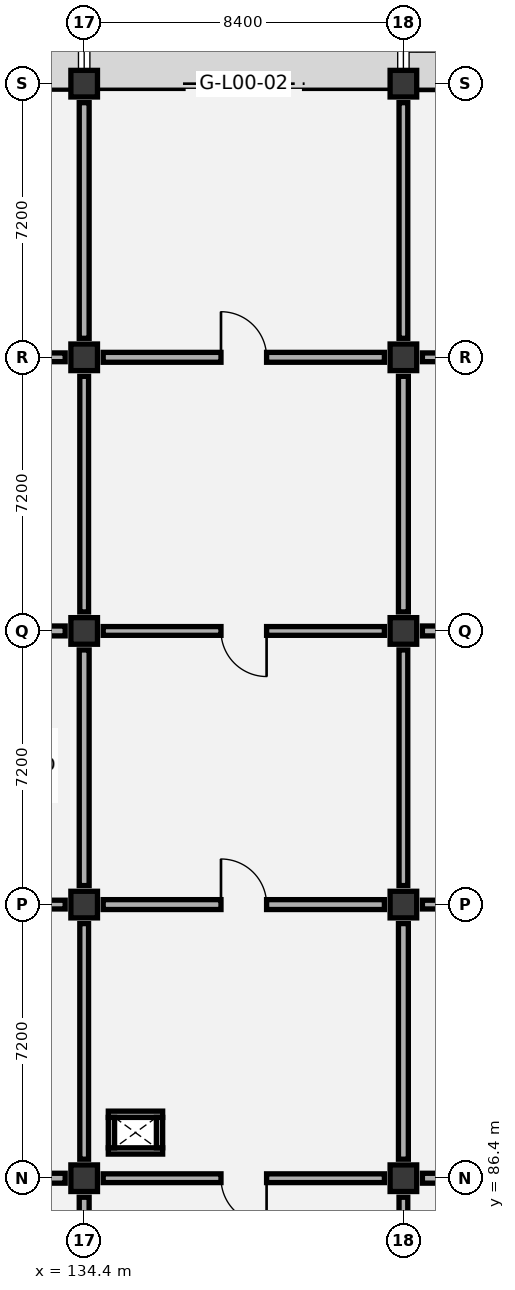
"""IFC4 building model, lengths in metres.
Left out: names, types, materials, properties, quantities, classifications, styles, units other than length and angle.
Written with IfcOpenShell. Run it as: python <this file> out.ifc"""

import sys

from ifc_helpers import new_model, si_unit, direction, frame, frame_2d, origin, origin_2d, place, context, subcontext, project, spatial, rectangle, extrude, element, fill, save


model = new_model("IFC4")
c1 = context("Model", 3, precision=1e-05, world=origin(), true_north=direction((0.0, 1.0)))
c2 = subcontext(c1, "Body", "Model", "MODEL_VIEW")
j1 = project(units=[si_unit("LENGTHUNIT", "METRE"), si_unit("PLANEANGLEUNIT", "RADIAN")], contexts=[c1])
p1 = place(None, origin())
s1 = spatial("IfcSite", under=j1, at=p1, CompositionType="ELEMENT")
p2 = place(p1, origin())
s2 = spatial("IfcBuilding", under=s1, at=p2, CompositionType="ELEMENT")
p3 = place(p2, origin())
s3 = spatial("IfcBuildingStorey", under=s2, at=p3, CompositionType="ELEMENT", Elevation=0.0)
for number, where, z_axis, x_axis in (
    (1, (134.4, 86.4, 0.0), (0.0, 0.0, 1.0), (1.0, 0.0, 0.0)),
    (2, (134.4, 93.6, 0.0), (0.0, 0.0, 1.0), (1.0, 0.0, 0.0)),
    (3, (134.4, 100.8, 0.0), (0.0, 0.0, 1.0), (1.0, 0.0, 0.0)),
    (4, (134.4, 108.0, 0.0), (0.0, 0.0, 1.0), (1.0, 0.0, 0.0)),
    (5, (134.4, 115.2, 0.0), (0.0, 0.0, 1.0), (1.0, 0.0, 0.0)),
    (6, (142.8, 86.4, 0.0), (0.0, 0.0, 1.0), (1.0, 0.0, 0.0)),
    (7, (142.8, 93.6, 0.0), (0.0, 0.0, 1.0), (1.0, 0.0, 0.0)),
    (8, (142.8, 100.8, 0.0), (0.0, 0.0, 1.0), (1.0, 0.0, 0.0)),
    (9, (142.8, 108.0, 0.0), (0.0, 0.0, 1.0), (1.0, 0.0, 0.0)),
    (10, (142.8, 115.2, 0.0), (0.0, 0.0, 1.0), (1.0, 0.0, 0.0)),
):
    element("IfcColumn", number, at=place(p3, frame(where, z_axis=z_axis, x_axis=x_axis)), inside=s3, PredefinedType="COLUMN", context=c2, shape_type="SweptSolid", body=[
        extrude(rectangle(XDim=0.7, YDim=0.7, at=origin_2d()), origin(), (0.0, 0.0, 1.0), 6.0),
    ])
p4 = place(p3, frame((126.35, 115.2, 0.0), z_axis=(0.0, 0.0, 1.0), x_axis=(1.0, 0.0, 0.0)))
e11 = element("IfcWall", 11, at=p4, inside=s3, PredefinedType="SOLIDWALL", context=c2, shape_type="SweptSolid", body=[
    extrude(rectangle(XDim=7.7, YDim=0.29, at=frame_2d((3.85, 0.0))), origin(), (0.0, 0.0, 1.0), 5.12),
])
p5 = place(p4, frame((2.05, 0.0, 0.0)))
e12 = element("IfcOpeningElement", 12, at=p5, cuts=e11, PredefinedType="OPENING", context=c2, shape_type="SweptSolid", body=[
    extrude(rectangle(XDim=3.6, YDim=3.6, at=frame_2d((1.8, 1.8))), frame((0.0, 0.155, 0.0), z_axis=(0.0, -1.0, 0.0), x_axis=(1.0, 0.0, 0.0)), (0.0, 0.0, 1.0), 0.31),
])
p6 = place(p3, frame((134.75, 115.2, 0.0), z_axis=(0.0, 0.0, 1.0), x_axis=(1.0, 0.0, 0.0)))
e13 = element("IfcWall", 13, at=p6, inside=s3, PredefinedType="SOLIDWALL", context=c2, shape_type="SweptSolid", body=[
    extrude(rectangle(XDim=7.7, YDim=0.25, at=frame_2d((3.85, 0.0))), origin(), (0.0, 0.0, 1.0), 5.12),
])
p7 = place(p6, frame((2.25, 0.0, 0.0)))
e14 = element("IfcOpeningElement", 14, at=p7, cuts=e13, PredefinedType="OPENING", context=c2, shape_type="SweptSolid", body=[
    extrude(rectangle(XDim=3.2, YDim=3.2, at=frame_2d((1.6, 1.6))), frame((0.0, 0.135, 0.0), z_axis=(0.0, -1.0, 0.0), x_axis=(1.0, 0.0, 0.0)), (0.0, 0.0, 1.0), 0.27),
])
p8 = place(p3, frame((143.15, 115.2, 0.0), z_axis=(0.0, 0.0, 1.0), x_axis=(1.0, 0.0, 0.0)))
e15 = element("IfcWall", 15, at=p8, inside=s3, PredefinedType="SOLIDWALL", context=c2, shape_type="SweptSolid", body=[
    extrude(rectangle(XDim=7.7, YDim=0.31, at=frame_2d((3.85, 0.0))), origin(), (0.0, 0.0, 1.0), 5.12),
])
p9 = place(p8, frame((2.45, 0.0, 0.0)))
e16 = element("IfcOpeningElement", 16, at=p9, cuts=e15, PredefinedType="OPENING", context=c2, shape_type="SweptSolid", body=[
    extrude(rectangle(XDim=2.8, YDim=3.0, at=frame_2d((1.4, 1.5))), frame((0.0, 0.165, 0.0), z_axis=(0.0, -1.0, 0.0), x_axis=(1.0, 0.0, 0.0)), (0.0, 0.0, 1.0), 0.33),
])
for number, where, z_axis, x_axis in (
    (17, (135.035, 87.117, 0.0), (0.0, 0.0, 1.0), (1.0, 0.0, 0.0)),
    (18, (135.035, 88.083, 0.0), (0.0, 0.0, 1.0), (1.0, 0.0, 0.0)),
):
    element("IfcWall", number, at=place(p3, frame(where, z_axis=z_axis, x_axis=x_axis)), inside=s3, PredefinedType="PARTITIONING", context=c2, shape_type="SweptSolid", body=[
        extrude(rectangle(XDim=1.43, YDim=0.165, at=frame_2d((0.715, 0.0))), origin(), (0.0, 0.0, 1.0), 5.675),
    ])
for number, where, z_axis, x_axis in (
    (19, (135.117, 87.2, 0.0), (0.0, 0.0, 1.0), (0.0, 1.0, 0.0)),
    (20, (136.383, 87.2, 0.0), (0.0, 0.0, 1.0), (0.0, 1.0, 0.0)),
):
    element("IfcWall", number, at=place(p3, frame(where, z_axis=z_axis, x_axis=x_axis)), inside=s3, PredefinedType="PARTITIONING", context=c2, shape_type="SweptSolid", body=[
        extrude(rectangle(XDim=0.8, YDim=0.165, at=frame_2d((0.4, 0.0))), origin(), (0.0, 0.0, 1.0), 5.675),
    ])
p10 = place(p3, frame((134.4, 79.7, 0.0), z_axis=(0.0, 0.0, 1.0), x_axis=(0.0, 1.0, 0.0)))
e21 = element("IfcWall", 21, at=p10, inside=s3, PredefinedType="PARTITIONING", context=c2, shape_type="SweptSolid", body=[
    extrude(rectangle(XDim=6.2, YDim=0.26, at=frame_2d((3.1, 0.0))), origin(), (0.0, 0.0, 1.0), 4.92),
])
p11 = place(p10, frame((2.5, 0.0, 0.0)))
e22 = element("IfcOpeningElement", 22, at=p11, cuts=e21, PredefinedType="OPENING", context=c2, shape_type="SweptSolid", body=[
    extrude(rectangle(XDim=1.2, YDim=2.1, at=frame_2d((0.6, 1.05))), frame((0.0, 0.14, 0.0), z_axis=(0.0, -1.0, 0.0), x_axis=(1.0, 0.0, 0.0)), (0.0, 0.0, 1.0), 0.28),
])
p12 = place(p3, frame((126.5, 86.4, 0.0), z_axis=(0.0, 0.0, 1.0), x_axis=(1.0, 0.0, 0.0)))
e23 = element("IfcWall", 23, at=p12, inside=s3, PredefinedType="PARTITIONING", context=c2, shape_type="SweptSolid", body=[
    extrude(rectangle(XDim=7.4, YDim=0.26, at=frame_2d((3.7, 0.0))), origin(), (0.0, 0.0, 1.0), 4.87),
])
p13 = place(p12, frame((3.1, 0.0, 0.0)))
e24 = element("IfcOpeningElement", 24, at=p13, cuts=e23, PredefinedType="OPENING", context=c2, shape_type="SweptSolid", body=[
    extrude(rectangle(XDim=1.2, YDim=2.1, at=frame_2d((0.6, 1.05))), frame((0.0, 0.14, 0.0), z_axis=(0.0, -1.0, 0.0), x_axis=(1.0, 0.0, 0.0)), (0.0, 0.0, 1.0), 0.28),
])
p14 = place(p3, frame((134.4, 86.9, 0.0), z_axis=(0.0, 0.0, 1.0), x_axis=(0.0, 1.0, 0.0)))
e25 = element("IfcWall", 25, at=p14, inside=s3, PredefinedType="PARTITIONING", context=c2, shape_type="SweptSolid", body=[
    extrude(rectangle(XDim=6.2, YDim=0.23, at=frame_2d((3.1, 0.0))), origin(), (0.0, 0.0, 1.0), 5.17),
])
p15 = place(p3, frame((126.5, 93.6, 0.0), z_axis=(0.0, 0.0, 1.0), x_axis=(1.0, 0.0, 0.0)))
e26 = element("IfcWall", 26, at=p15, inside=s3, PredefinedType="PARTITIONING", context=c2, shape_type="SweptSolid", body=[
    extrude(rectangle(XDim=7.4, YDim=0.23, at=frame_2d((3.7, 0.0))), origin(), (0.0, 0.0, 1.0), 4.87),
])
p16 = place(p15, frame((3.1, 0.0, 0.0)))
e27 = element("IfcOpeningElement", 27, at=p16, cuts=e26, PredefinedType="OPENING", context=c2, shape_type="SweptSolid", body=[
    extrude(rectangle(XDim=1.2, YDim=2.1, at=frame_2d((0.6, 1.05))), frame((0.0, 0.125, 0.0), z_axis=(0.0, -1.0, 0.0), x_axis=(1.0, 0.0, 0.0)), (0.0, 0.0, 1.0), 0.25),
])
p17 = place(p3, frame((134.4, 94.1, 0.0), z_axis=(0.0, 0.0, 1.0), x_axis=(0.0, 1.0, 0.0)))
e28 = element("IfcWall", 28, at=p17, inside=s3, PredefinedType="PARTITIONING", context=c2, shape_type="SweptSolid", body=[
    extrude(rectangle(XDim=6.2, YDim=0.26, at=frame_2d((3.1, 0.0))), origin(), (0.0, 0.0, 1.0), 5.02),
])
p18 = place(p3, frame((126.5, 100.8, 0.0), z_axis=(0.0, 0.0, 1.0), x_axis=(1.0, 0.0, 0.0)))
e29 = element("IfcWall", 29, at=p18, inside=s3, PredefinedType="PARTITIONING", context=c2, shape_type="SweptSolid", body=[
    extrude(rectangle(XDim=7.4, YDim=0.26, at=frame_2d((3.7, 0.0))), origin(), (0.0, 0.0, 1.0), 4.97),
])
p19 = place(p18, frame((3.1, 0.0, 0.0)))
e30 = element("IfcOpeningElement", 30, at=p19, cuts=e29, PredefinedType="OPENING", context=c2, shape_type="SweptSolid", body=[
    extrude(rectangle(XDim=1.2, YDim=2.1, at=frame_2d((0.6, 1.05))), frame((0.0, 0.14, 0.0), z_axis=(0.0, -1.0, 0.0), x_axis=(1.0, 0.0, 0.0)), (0.0, 0.0, 1.0), 0.28),
])
p20 = place(p3, frame((134.4, 101.3, 0.0), z_axis=(0.0, 0.0, 1.0), x_axis=(0.0, 1.0, 0.0)))
e31 = element("IfcWall", 31, at=p20, inside=s3, PredefinedType="PARTITIONING", context=c2, shape_type="SweptSolid", body=[
    extrude(rectangle(XDim=6.2, YDim=0.23, at=frame_2d((3.1, 0.0))), origin(), (0.0, 0.0, 1.0), 5.37),
])
p21 = place(p3, frame((126.5, 108.0, 0.0), z_axis=(0.0, 0.0, 1.0), x_axis=(1.0, 0.0, 0.0)))
e32 = element("IfcWall", 32, at=p21, inside=s3, PredefinedType="PARTITIONING", context=c2, shape_type="SweptSolid", body=[
    extrude(rectangle(XDim=7.4, YDim=0.23, at=frame_2d((3.7, 0.0))), origin(), (0.0, 0.0, 1.0), 4.97),
])
p22 = place(p21, frame((3.1, 0.0, 0.0)))
e33 = element("IfcOpeningElement", 33, at=p22, cuts=e32, PredefinedType="OPENING", context=c2, shape_type="SweptSolid", body=[
    extrude(rectangle(XDim=1.2, YDim=2.1, at=frame_2d((0.6, 1.05))), frame((0.0, 0.125, 0.0), z_axis=(0.0, -1.0, 0.0), x_axis=(1.0, 0.0, 0.0)), (0.0, 0.0, 1.0), 0.25),
])
p23 = place(p3, frame((134.4, 108.5, 0.0), z_axis=(0.0, 0.0, 1.0), x_axis=(0.0, 1.0, 0.0)))
e34 = element("IfcWall", 34, at=p23, inside=s3, PredefinedType="PARTITIONING", context=c2, shape_type="SweptSolid", body=[
    extrude(rectangle(XDim=6.2, YDim=0.26, at=frame_2d((3.1, 0.0))), origin(), (0.0, 0.0, 1.0), 5.02),
])
p24 = place(p3, frame((142.8, 79.7, 0.0), z_axis=(0.0, 0.0, 1.0), x_axis=(0.0, 1.0, 0.0)))
e35 = element("IfcWall", 35, at=p24, inside=s3, PredefinedType="PARTITIONING", context=c2, shape_type="SweptSolid", body=[
    extrude(rectangle(XDim=6.2, YDim=0.23, at=frame_2d((3.1, 0.0))), origin(), (0.0, 0.0, 1.0), 5.17),
])
p25 = place(p24, frame((2.5, 0.0, 0.0)))
e36 = element("IfcOpeningElement", 36, at=p25, cuts=e35, PredefinedType="OPENING", context=c2, shape_type="SweptSolid", body=[
    extrude(rectangle(XDim=1.2, YDim=2.1, at=frame_2d((0.6, 1.05))), frame((0.0, 0.125, 0.0), z_axis=(0.0, -1.0, 0.0), x_axis=(1.0, 0.0, 0.0)), (0.0, 0.0, 1.0), 0.25),
])
p26 = place(p3, frame((134.9, 86.4, 0.0), z_axis=(0.0, 0.0, 1.0), x_axis=(1.0, 0.0, 0.0)))
e37 = element("IfcWall", 37, at=p26, inside=s3, PredefinedType="PARTITIONING", context=c2, shape_type="SweptSolid", body=[
    extrude(rectangle(XDim=7.4, YDim=0.23, at=frame_2d((3.7, 0.0))), origin(), (0.0, 0.0, 1.0), 4.87),
])
p27 = place(p26, frame((3.1, 0.0, 0.0)))
e38 = element("IfcOpeningElement", 38, at=p27, cuts=e37, PredefinedType="OPENING", context=c2, shape_type="SweptSolid", body=[
    extrude(rectangle(XDim=1.2, YDim=2.1, at=frame_2d((0.6, 1.05))), frame((0.0, 0.125, 0.0), z_axis=(0.0, -1.0, 0.0), x_axis=(1.0, 0.0, 0.0)), (0.0, 0.0, 1.0), 0.25),
])
p28 = place(p3, frame((142.8, 86.9, 0.0), z_axis=(0.0, 0.0, 1.0), x_axis=(0.0, 1.0, 0.0)))
e39 = element("IfcWall", 39, at=p28, inside=s3, PredefinedType="PARTITIONING", context=c2, shape_type="SweptSolid", body=[
    extrude(rectangle(XDim=6.2, YDim=0.26, at=frame_2d((3.1, 0.0))), origin(), (0.0, 0.0, 1.0), 4.92),
])
p29 = place(p3, frame((134.9, 93.6, 0.0), z_axis=(0.0, 0.0, 1.0), x_axis=(1.0, 0.0, 0.0)))
e40 = element("IfcWall", 40, at=p29, inside=s3, PredefinedType="PARTITIONING", context=c2, shape_type="SweptSolid", body=[
    extrude(rectangle(XDim=7.4, YDim=0.26, at=frame_2d((3.7, 0.0))), origin(), (0.0, 0.0, 1.0), 4.87),
])
p30 = place(p29, frame((3.1, 0.0, 0.0)))
e41 = element("IfcOpeningElement", 41, at=p30, cuts=e40, PredefinedType="OPENING", context=c2, shape_type="SweptSolid", body=[
    extrude(rectangle(XDim=1.2, YDim=2.1, at=frame_2d((0.6, 1.05))), frame((0.0, 0.14, 0.0), z_axis=(0.0, -1.0, 0.0), x_axis=(1.0, 0.0, 0.0)), (0.0, 0.0, 1.0), 0.28),
])
p31 = place(p3, frame((142.8, 94.1, 0.0), z_axis=(0.0, 0.0, 1.0), x_axis=(0.0, 1.0, 0.0)))
e42 = element("IfcWall", 42, at=p31, inside=s3, PredefinedType="PARTITIONING", context=c2, shape_type="SweptSolid", body=[
    extrude(rectangle(XDim=6.2, YDim=0.23, at=frame_2d((3.1, 0.0))), origin(), (0.0, 0.0, 1.0), 5.37),
])
p32 = place(p3, frame((134.9, 100.8, 0.0), z_axis=(0.0, 0.0, 1.0), x_axis=(1.0, 0.0, 0.0)))
e43 = element("IfcWall", 43, at=p32, inside=s3, PredefinedType="PARTITIONING", context=c2, shape_type="SweptSolid", body=[
    extrude(rectangle(XDim=7.4, YDim=0.23, at=frame_2d((3.7, 0.0))), origin(), (0.0, 0.0, 1.0), 4.97),
])
p33 = place(p32, frame((3.1, 0.0, 0.0)))
e44 = element("IfcOpeningElement", 44, at=p33, cuts=e43, PredefinedType="OPENING", context=c2, shape_type="SweptSolid", body=[
    extrude(rectangle(XDim=1.2, YDim=2.1, at=frame_2d((0.6, 1.05))), frame((0.0, 0.125, 0.0), z_axis=(0.0, -1.0, 0.0), x_axis=(1.0, 0.0, 0.0)), (0.0, 0.0, 1.0), 0.25),
])
p34 = place(p3, frame((142.8, 101.3, 0.0), z_axis=(0.0, 0.0, 1.0), x_axis=(0.0, 1.0, 0.0)))
e45 = element("IfcWall", 45, at=p34, inside=s3, PredefinedType="PARTITIONING", context=c2, shape_type="SweptSolid", body=[
    extrude(rectangle(XDim=6.2, YDim=0.26, at=frame_2d((3.1, 0.0))), origin(), (0.0, 0.0, 1.0), 5.02),
])
p35 = place(p3, frame((134.9, 108.0, 0.0), z_axis=(0.0, 0.0, 1.0), x_axis=(1.0, 0.0, 0.0)))
e46 = element("IfcWall", 46, at=p35, inside=s3, PredefinedType="PARTITIONING", context=c2, shape_type="SweptSolid", body=[
    extrude(rectangle(XDim=7.4, YDim=0.26, at=frame_2d((3.7, 0.0))), origin(), (0.0, 0.0, 1.0), 4.97),
])
p36 = place(p35, frame((3.1, 0.0, 0.0)))
e47 = element("IfcOpeningElement", 47, at=p36, cuts=e46, PredefinedType="OPENING", context=c2, shape_type="SweptSolid", body=[
    extrude(rectangle(XDim=1.2, YDim=2.1, at=frame_2d((0.6, 1.05))), frame((0.0, 0.14, 0.0), z_axis=(0.0, -1.0, 0.0), x_axis=(1.0, 0.0, 0.0)), (0.0, 0.0, 1.0), 0.28),
])
p37 = place(p3, frame((142.8, 108.5, 0.0), z_axis=(0.0, 0.0, 1.0), x_axis=(0.0, 1.0, 0.0)))
e48 = element("IfcWall", 48, at=p37, inside=s3, PredefinedType="PARTITIONING", context=c2, shape_type="SweptSolid", body=[
    extrude(rectangle(XDim=6.2, YDim=0.23, at=frame_2d((3.1, 0.0))), origin(), (0.0, 0.0, 1.0), 5.48),
])
p38 = place(p3, frame((143.3, 86.4, 0.0), z_axis=(0.0, 0.0, 1.0), x_axis=(1.0, 0.0, 0.0)))
e49 = element("IfcWall", 49, at=p38, inside=s3, PredefinedType="PARTITIONING", context=c2, shape_type="SweptSolid", body=[
    extrude(rectangle(XDim=7.4, YDim=0.26, at=frame_2d((3.7, 0.0))), origin(), (0.0, 0.0, 1.0), 4.87),
])
p39 = place(p38, frame((3.1, 0.0, 0.0)))
e50 = element("IfcOpeningElement", 50, at=p39, cuts=e49, PredefinedType="OPENING", context=c2, shape_type="SweptSolid", body=[
    extrude(rectangle(XDim=1.2, YDim=2.1, at=frame_2d((0.6, 1.05))), frame((0.0, 0.14, 0.0), z_axis=(0.0, -1.0, 0.0), x_axis=(1.0, 0.0, 0.0)), (0.0, 0.0, 1.0), 0.28),
])
p40 = place(p3, frame((143.3, 93.6, 0.0), z_axis=(0.0, 0.0, 1.0), x_axis=(1.0, 0.0, 0.0)))
e51 = element("IfcWall", 51, at=p40, inside=s3, PredefinedType="PARTITIONING", context=c2, shape_type="SweptSolid", body=[
    extrude(rectangle(XDim=7.4, YDim=0.23, at=frame_2d((3.7, 0.0))), origin(), (0.0, 0.0, 1.0), 4.87),
])
p41 = place(p40, frame((3.1, 0.0, 0.0)))
e52 = element("IfcOpeningElement", 52, at=p41, cuts=e51, PredefinedType="OPENING", context=c2, shape_type="SweptSolid", body=[
    extrude(rectangle(XDim=1.2, YDim=2.1, at=frame_2d((0.6, 1.05))), frame((0.0, 0.125, 0.0), z_axis=(0.0, -1.0, 0.0), x_axis=(1.0, 0.0, 0.0)), (0.0, 0.0, 1.0), 0.25),
])
p42 = place(p3, frame((143.3, 100.8, 0.0), z_axis=(0.0, 0.0, 1.0), x_axis=(1.0, 0.0, 0.0)))
e53 = element("IfcWall", 53, at=p42, inside=s3, PredefinedType="PARTITIONING", context=c2, shape_type="SweptSolid", body=[
    extrude(rectangle(XDim=7.4, YDim=0.26, at=frame_2d((3.7, 0.0))), origin(), (0.0, 0.0, 1.0), 4.97),
])
p43 = place(p42, frame((3.1, 0.0, 0.0)))
e54 = element("IfcOpeningElement", 54, at=p43, cuts=e53, PredefinedType="OPENING", context=c2, shape_type="SweptSolid", body=[
    extrude(rectangle(XDim=1.2, YDim=2.1, at=frame_2d((0.6, 1.05))), frame((0.0, 0.14, 0.0), z_axis=(0.0, -1.0, 0.0), x_axis=(1.0, 0.0, 0.0)), (0.0, 0.0, 1.0), 0.28),
])
p44 = place(p3, frame((143.3, 108.0, 0.0), z_axis=(0.0, 0.0, 1.0), x_axis=(1.0, 0.0, 0.0)))
e55 = element("IfcWall", 55, at=p44, inside=s3, PredefinedType="PARTITIONING", context=c2, shape_type="SweptSolid", body=[
    extrude(rectangle(XDim=7.4, YDim=0.23, at=frame_2d((3.7, 0.0))), origin(), (0.0, 0.0, 1.0), 4.97),
])
p45 = place(p44, frame((3.1, 0.0, 0.0)))
e56 = element("IfcOpeningElement", 56, at=p45, cuts=e55, PredefinedType="OPENING", context=c2, shape_type="SweptSolid", body=[
    extrude(rectangle(XDim=1.2, YDim=2.1, at=frame_2d((0.6, 1.05))), frame((0.0, 0.125, 0.0), z_axis=(0.0, -1.0, 0.0), x_axis=(1.0, 0.0, 0.0)), (0.0, 0.0, 1.0), 0.25),
])
p46 = place(p7, origin())
e57 = element("IfcDoor", 57, at=p46, inside=s3, OperationType="ROLLINGUP", PredefinedType="GATE", context=c2, shape_type="SweptSolid", body=[
    extrude(rectangle(XDim=3.2, YDim=3.2, at=frame_2d((1.6, 1.6))), frame((0.0, 0.025, 0.0), z_axis=(0.0, -1.0, 0.0), x_axis=(1.0, 0.0, 0.0)), (0.0, 0.0, 1.0), 0.05),
])
fill(e14, e57)
p47 = place(p27, frame((1.2, 0.0, 0.0), z_axis=(0.0, 0.0, 1.0), x_axis=(-1.0, 0.0, 0.0)))
e58 = element("IfcDoor", 58, at=p47, inside=s3, OperationType="SINGLE_SWING_LEFT", PredefinedType="DOOR", context=c2, shape_type="SweptSolid", body=[
    extrude(rectangle(XDim=1.2, YDim=2.1, at=frame_2d((0.6, 1.05))), frame((0.0, 0.025, 0.0), z_axis=(0.0, -1.0, 0.0), x_axis=(1.0, 0.0, 0.0)), (0.0, 0.0, 1.0), 0.05),
])
fill(e38, e58)
p48 = place(p30, origin())
e59 = element("IfcDoor", 59, at=p48, inside=s3, OperationType="SINGLE_SWING_LEFT", PredefinedType="DOOR", context=c2, shape_type="SweptSolid", body=[
    extrude(rectangle(XDim=1.2, YDim=2.1, at=frame_2d((0.6, 1.05))), frame((0.0, 0.025, 0.0), z_axis=(0.0, -1.0, 0.0), x_axis=(1.0, 0.0, 0.0)), (0.0, 0.0, 1.0), 0.05),
])
fill(e41, e59)
p49 = place(p33, frame((1.2, 0.0, 0.0), z_axis=(0.0, 0.0, 1.0), x_axis=(-1.0, 0.0, 0.0)))
e60 = element("IfcDoor", 60, at=p49, inside=s3, OperationType="SINGLE_SWING_LEFT", PredefinedType="DOOR", context=c2, shape_type="SweptSolid", body=[
    extrude(rectangle(XDim=1.2, YDim=2.1, at=frame_2d((0.6, 1.05))), frame((0.0, 0.025, 0.0), z_axis=(0.0, -1.0, 0.0), x_axis=(1.0, 0.0, 0.0)), (0.0, 0.0, 1.0), 0.05),
])
fill(e44, e60)
p50 = place(p36, origin())
e61 = element("IfcDoor", 61, at=p50, inside=s3, OperationType="SINGLE_SWING_LEFT", PredefinedType="DOOR", context=c2, shape_type="SweptSolid", body=[
    extrude(rectangle(XDim=1.2, YDim=2.1, at=frame_2d((0.6, 1.05))), frame((0.0, 0.025, 0.0), z_axis=(0.0, -1.0, 0.0), x_axis=(1.0, 0.0, 0.0)), (0.0, 0.0, 1.0), 0.05),
])
fill(e47, e61)
save(model, sys.argv[1])
